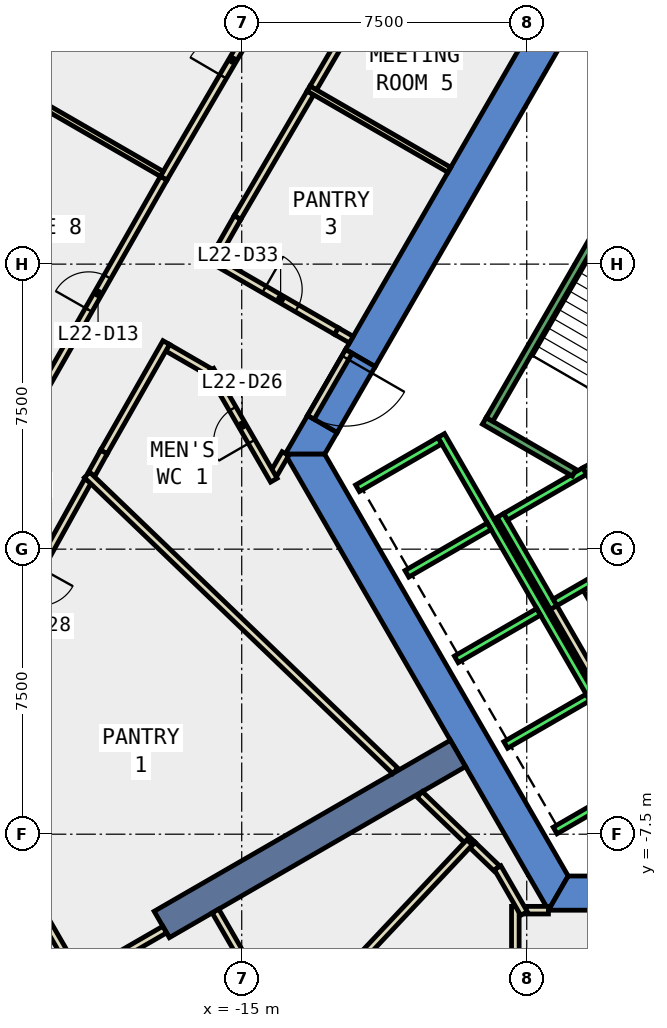
"""IFC4 building model, lengths in metres.
Left out: names, types, materials, properties, quantities, classifications, styles, units other than length and angle.
Written with IfcOpenShell. Run it as: python <this file> out.ifc"""

import sys

from ifc_helpers import new_model, si_unit, direction, frame, frame_2d, origin, place, context, subcontext, project, spatial, polyline, rectangle, outline, extrude, element, fill, save


model = new_model("IFC4")
c1 = context("Model", 3, precision=1e-05, world=origin(), true_north=direction((0.0, 1.0)))
c2 = subcontext(c1, "Body", "Model", "MODEL_VIEW")
j1 = project(units=[si_unit("LENGTHUNIT", "METRE"), si_unit("PLANEANGLEUNIT", "RADIAN")], contexts=[c1])
p1 = place(None, origin())
s1 = spatial("IfcSite", under=j1, at=p1, CompositionType="ELEMENT")
p2 = place(p1, origin())
s2 = spatial("IfcBuilding", under=s1, at=p2, CompositionType="ELEMENT")
p3 = place(p2, frame((0.0, 0.0, 103.4)))
s3 = spatial("IfcBuildingStorey", under=s2, at=p3, CompositionType="ELEMENT", Elevation=103.4)
p4 = place(p3, frame((0.0, 0.0, -0.4)))
e1 = element("IfcWall", 1, at=p4, inside=s3, PredefinedType="SHEAR", context=c2, shape_type="SweptSolid", body=[
    extrude(outline(polyline([(-12.267, 5.252), (-11.488, 4.802), (-6.409, 13.6), (-6.928, 14.5), (-12.267, 5.252)])), origin(), (0.0, 0.0, 1.0), 4.2),
])
p5 = place(p3, frame((0.0, 0.0, -0.4)))
e2 = element("IfcWall", 2, at=p5, inside=s3, PredefinedType="SHEAR", context=c2, shape_type="SweptSolid", body=[
    extrude(outline(polyline([(-12.488, 3.07), (-13.267, 3.52), (-13.856, 2.5), (-12.817, 2.5), (-12.488, 3.07)])), origin(), (0.0, 0.0, 1.0), 4.2),
])
p6 = place(p3, frame((0.0, 0.0, 3.6)))
e3 = element("IfcWall", 3, at=p6, inside=s3, PredefinedType="SHEAR", context=c2, shape_type="SweptSolid", body=[
    extrude(outline(polyline([(-13.267, 3.52), (-12.488, 3.07), (-11.488, 4.802), (-12.267, 5.252), (-13.267, 3.52)])), origin(), (0.0, 0.0, 1.0), 0.2),
])
p7 = place(p3, frame((0.0, 0.0, -0.4)))
e4 = element("IfcWall", 4, at=p7, inside=s3, PredefinedType="SHEAR", context=c2, shape_type="SweptSolid", body=[
    extrude(outline(polyline([(-13.856, 2.5), (-6.928, -9.5), (-6.409, -8.6), (-12.817, 2.5), (-13.856, 2.5)])), origin(), (0.0, 0.0, 1.0), 4.2),
])
p8 = place(p3, frame((0.0, 0.0, -0.4)))
e5 = element("IfcWall", 5, at=p8, inside=s3, PredefinedType="SHEAR", context=c2, shape_type="SweptSolid", body=[
    extrude(outline(polyline([(3.75, -9.5), (3.75, -8.6), (-6.409, -8.6), (-6.928, -9.5), (3.75, -9.5)])), origin(), (0.0, 0.0, 1.0), 4.2),
])
p9 = place(p3, frame((-9.31, -5.375, -0.4), z_axis=(0.0, 0.0, 1.0), x_axis=(-0.866017533419, -0.500013631625, 0.0)))
e6 = element("IfcWall", 6, at=p9, inside=s3, PredefinedType="SHEAR", context=c2, shape_type="SweptSolid", body=[
    extrude(rectangle(XDim=9.0, YDim=0.8, at=frame_2d((4.5, 0.0))), origin(), (0.0, 0.0, 1.0), 4.2),
])
p10 = place(p3, frame((-11.814, 14.364, 0.0), z_axis=(0.0, 0.0, 1.0), x_axis=(-0.504658640018, -0.863318977583, 0.0)))
e7 = element("IfcWall", 7, at=p10, inside=s3, PredefinedType="PARTITIONING", context=c2, shape_type="SweptSolid", body=[
    extrude(rectangle(XDim=2.582, YDim=0.2, at=frame_2d((1.291, 0.0))), origin(), (0.0, 0.0, 1.0), 3.8),
])
p11 = place(p3, frame((-13.193, 12.005, 0.0), z_axis=(0.0, 0.0, 1.0), x_axis=(-0.50499711829, -0.863121028894, 0.0)))
e8 = element("IfcWall", 8, at=p11, inside=s3, PredefinedType="PARTITIONING", context=c2, shape_type="SweptSolid", body=[
    extrude(rectangle(XDim=3.8, YDim=0.2, at=frame_2d((1.9, 0.0))), origin(), (0.0, 0.0, 1.0), 3.8),
])
p12 = place(p3, frame((-15.112, 8.725, 0.0), z_axis=(0.0, 0.0, 1.0), x_axis=(-0.495074026382, -0.868850797549, 0.0)))
e9 = element("IfcWall", 9, at=p12, inside=s3, PredefinedType="PARTITIONING", context=c2, shape_type="SweptSolid", body=[
    extrude(rectangle(XDim=1.186, YDim=0.2, at=frame_2d((0.593, 0.0))), origin(), (0.0, 0.0, 1.0), 3.8),
])
p13 = place(p3, frame((-15.835, 7.658, 0.0), z_axis=(0.0, 0.0, 1.0), x_axis=(0.866076614194, -0.499911290476, 0.0)))
e10 = element("IfcWall", 10, at=p13, inside=s3, PredefinedType="PARTITIONING", context=c2, shape_type="SweptSolid", body=[
    extrude(rectangle(XDim=3.843, YDim=0.2, at=frame_2d((1.921, 0.0))), origin(), (0.0, 0.0, 1.0), 3.8),
])
p14 = place(p13, frame((1.646, 0.0, 0.0)))
e11 = element("IfcOpeningElement", 11, at=p14, cuts=e10, PredefinedType="OPENING", context=c2, shape_type="SweptSolid", body=[
    extrude(rectangle(XDim=1.0, YDim=2.1, at=frame_2d((0.5, 1.05))), frame((0.0, 0.11, 0.0), z_axis=(0.0, -1.0, 0.0), x_axis=(1.0, 0.0, 0.0)), (0.0, 0.0, 1.0), 0.22),
])
p15 = place(p3, frame((-13.85, 2.514, 0.0), z_axis=(0.0, 0.0, 1.0), x_axis=(-0.500418219013, -0.865783810244, 0.0)))
e12 = element("IfcWall", 12, at=p15, inside=s3, PredefinedType="PARTITIONING", context=c2, shape_type="SweptSolid", body=[
    extrude(rectangle(XDim=0.607, YDim=0.2, at=frame_2d((0.304, 0.0))), origin(), (0.0, 0.0, 1.0), 3.8),
])
p16 = place(p3, frame((-14.154, 1.815, 0.0), z_axis=(0.0, 0.0, 1.0), x_axis=(-0.500038857296, 0.866002968352, 0.0)))
e13 = element("IfcWall", 13, at=p16, inside=s3, PredefinedType="PARTITIONING", context=c2, shape_type="SweptSolid", body=[
    extrude(rectangle(XDim=3.34, YDim=0.2, at=frame_2d((1.67, 0.0))), origin(), (0.0, 0.0, 1.0), 3.8),
])
p17 = place(p16, frame((1.17, 0.0, 0.0)))
e14 = element("IfcOpeningElement", 14, at=p17, cuts=e13, PredefinedType="OPENING", context=c2, shape_type="SweptSolid", body=[
    extrude(rectangle(XDim=1.0, YDim=2.1, at=frame_2d((0.5, 1.05))), frame((0.0, 0.11, 0.0), z_axis=(0.0, -1.0, 0.0), x_axis=(1.0, 0.0, 0.0)), (0.0, 0.0, 1.0), 0.22),
])
p18 = place(p3, frame((-15.86, 4.671, 0.0), z_axis=(0.0, 0.0, 1.0), x_axis=(-0.866192052573, 0.49971124468, 0.0)))
e15 = element("IfcWall", 15, at=p18, inside=s3, PredefinedType="PARTITIONING", context=c2, shape_type="SweptSolid", body=[
    extrude(rectangle(XDim=1.257, YDim=0.2, at=frame_2d((0.628, 0.0))), origin(), (0.0, 0.0, 1.0), 3.8),
])
p19 = place(p3, frame((-16.986, 5.436, 0.0), z_axis=(0.0, 0.0, 1.0), x_axis=(-0.49514688151, -0.868809280412, 0.0)))
e16 = element("IfcWall", 16, at=p19, inside=s3, PredefinedType="PARTITIONING", context=c2, shape_type="SweptSolid", body=[
    extrude(rectangle(XDim=3.314, YDim=0.2, at=frame_2d((1.657, 0.0))), origin(), (0.0, 0.0, 1.0), 3.8),
])
p20 = place(p3, frame((-18.627, 2.557, 0.0), z_axis=(0.0, 0.0, 1.0), x_axis=(-0.484771582084, -0.874640790956, 0.0)))
e17 = element("IfcWall", 17, at=p20, inside=s3, PredefinedType="PARTITIONING", context=c2, shape_type="SweptSolid", body=[
    extrude(rectangle(XDim=0.666, YDim=0.2, at=frame_2d((0.333, 0.0))), origin(), (0.0, 0.0, 1.0), 3.8),
])
p21 = place(p3, frame((-19.047, 1.799, 0.0), z_axis=(0.0, 0.0, 1.0), x_axis=(-0.485240396382, -0.87438078531, 0.0)))
e18 = element("IfcWall", 18, at=p21, inside=s3, PredefinedType="PARTITIONING", context=c2, shape_type="SweptSolid", body=[
    extrude(rectangle(XDim=6.232, YDim=0.2, at=frame_2d((3.116, 0.0))), origin(), (0.0, 0.0, 1.0), 3.8),
])
p22 = place(p21, frame((2.616, 0.0, 0.0)))
e19 = element("IfcOpeningElement", 19, at=p22, cuts=e18, PredefinedType="OPENING", context=c2, shape_type="SweptSolid", body=[
    extrude(rectangle(XDim=1.0, YDim=2.1, at=frame_2d((0.5, 1.05))), frame((0.0, 0.11, 0.0), z_axis=(0.0, -1.0, 0.0), x_axis=(1.0, 0.0, 0.0)), (0.0, 0.0, 1.0), 0.22),
])
p23 = place(p3, frame((-17.055, 9.76, 0.0), z_axis=(0.0, 0.0, 1.0), x_axis=(0.504817517618, 0.863226085047, 0.0)))
e20 = element("IfcWall", 20, at=p23, inside=s3, PredefinedType="PARTITIONING", context=c2, shape_type="SweptSolid", body=[
    extrude(rectangle(XDim=7.199, YDim=0.2, at=frame_2d((3.599, 0.0))), origin(), (0.0, 0.0, 1.0), 3.8),
])
p24 = place(p23, frame((3.099, 0.0, 0.0)))
e21 = element("IfcOpeningElement", 21, at=p24, cuts=e20, PredefinedType="OPENING", context=c2, shape_type="SweptSolid", body=[
    extrude(rectangle(XDim=1.0, YDim=2.1, at=frame_2d((0.5, 1.05))), frame((0.0, 0.11, 0.0), z_axis=(0.0, -1.0, 0.0), x_axis=(1.0, 0.0, 0.0)), (0.0, 0.0, 1.0), 0.22),
])
p25 = place(p3, frame((-20.581, 3.571, 0.0), z_axis=(0.0, 0.0, 1.0), x_axis=(0.495138372197, 0.868814129937, 0.0)))
e22 = element("IfcWall", 22, at=p25, inside=s3, PredefinedType="PARTITIONING", context=c2, shape_type="SweptSolid", body=[
    extrude(rectangle(XDim=7.124, YDim=0.2, at=frame_2d((3.562, 0.0))), origin(), (0.0, 0.0, 1.0), 3.8),
])
p26 = place(p25, frame((3.137, 0.0, 0.0)))
e23 = element("IfcOpeningElement", 23, at=p26, cuts=e22, PredefinedType="OPENING", context=c2, shape_type="SweptSolid", body=[
    extrude(rectangle(XDim=1.0, YDim=2.1, at=frame_2d((0.5, 1.05))), frame((0.0, 0.11, 0.0), z_axis=(0.0, -1.0, 0.0), x_axis=(1.0, 0.0, 0.0)), (0.0, 0.0, 1.0), 0.22),
])
p27 = place(p3, frame((-5.126, -2.422, 0.0), z_axis=(0.0, 0.0, 1.0), x_axis=(-0.500062241894, 0.865989465428, 0.0)))
e24 = element("IfcWall", 24, at=p27, inside=s3, PredefinedType="PARTITIONING", context=c2, shape_type="SweptSolid", body=[
    extrude(rectangle(XDim=1.7, YDim=0.2, at=frame_2d((0.85, 0.0))), origin(), (0.0, 0.0, 1.0), 3.8),
])
p28 = place(p3, frame((-5.492, -3.788, 0.0), z_axis=(0.0, 0.0, 1.0), x_axis=(-0.500008949224, 0.866020236886, 0.0)))
e25 = element("IfcWall", 25, at=p28, inside=s3, PredefinedType="PARTITIONING", context=c2, shape_type="SweptSolid", body=[
    extrude(rectangle(XDim=2.68, YDim=0.2, at=frame_2d((1.34, 0.0))), origin(), (0.0, 0.0, 1.0), 3.8),
])
p29 = place(p3, frame((-9.537, 9.981, 0.0), z_axis=(0.0, 0.0, 1.0), x_axis=(-0.866007866579, 0.5000303741, 0.0)))
e26 = element("IfcWall", 26, at=p29, inside=s3, PredefinedType="PARTITIONING", context=c2, shape_type="SweptSolid", body=[
    extrude(rectangle(XDim=4.278, YDim=0.15, at=frame_2d((2.139, 0.0))), origin(), (0.0, 0.0, 1.0), 3.8),
])
p30 = place(p3, frame((-7.522, -9.499, 0.0), z_axis=(0.0, 0.0, 1.0), x_axis=(1.0, 0.0, 0.0)))
e27 = element("IfcWall", 27, at=p30, inside=s3, PredefinedType="PARTITIONING", context=c2, shape_type="SweptSolid", body=[
    extrude(rectangle(XDim=0.593, YDim=0.2, at=frame_2d((0.296, 0.0))), origin(), (0.0, 0.0, 1.0), 3.8),
])
p31 = place(p3, frame((-7.8, -17.765, 0.0), z_axis=(0.0, 0.0, 1.0), x_axis=(0.0, 1.0, 0.0)))
e28 = element("IfcWall", 28, at=p31, inside=s3, PredefinedType="PARTITIONING", context=c2, shape_type="SweptSolid", body=[
    extrude(rectangle(XDim=8.366, YDim=0.2, at=frame_2d((4.183, 0.0))), origin(), (0.0, 0.0, 1.0), 3.8),
])
p32 = place(p31, frame((3.683, 0.0, 0.0)))
e29 = element("IfcOpeningElement", 29, at=p32, cuts=e28, PredefinedType="OPENING", context=c2, shape_type="SweptSolid", body=[
    extrude(rectangle(XDim=1.0, YDim=2.1, at=frame_2d((0.5, 1.05))), frame((0.0, 0.11, 0.0), z_axis=(0.0, -1.0, 0.0), x_axis=(1.0, 0.0, 0.0)), (0.0, 0.0, 1.0), 0.22),
])
p33 = place(p3, frame((-8.93, -7.783, 0.0), z_axis=(0.0, 0.0, 1.0), x_axis=(0.720954255291, -0.692982656189, 0.0)))
e30 = element("IfcWall", 30, at=p33, inside=s3, PredefinedType="PARTITIONING", context=c2, shape_type="SweptSolid", body=[
    extrude(rectangle(XDim=0.89, YDim=0.2, at=frame_2d((0.445, 0.0))), origin(), (0.0, 0.0, 1.0), 3.8),
])
p34 = place(p3, frame((-7.572, -9.586, 0.0), z_axis=(0.0, 0.0, 1.0), x_axis=(-0.499484152563, 0.866323023669, 0.0)))
e31 = element("IfcWall", 31, at=p34, inside=s3, PredefinedType="PARTITIONING", context=c2, shape_type="SweptSolid", body=[
    extrude(rectangle(XDim=1.39, YDim=0.2, at=frame_2d((0.695, 0.0))), origin(), (0.0, 0.0, 1.0), 3.8),
])
p35 = place(p3, frame((-8.93, -7.783, 0.0), z_axis=(0.0, 0.0, 1.0), x_axis=(-0.72124523191, 0.692679807305, 0.0)))
e32 = element("IfcWall", 32, at=p35, inside=s3, PredefinedType="PARTITIONING", context=c2, shape_type="SweptSolid", body=[
    extrude(rectangle(XDim=1.923, YDim=0.2, at=frame_2d((0.961, 0.0))), origin(), (0.0, 0.0, 1.0), 3.8),
])
p36 = place(p3, frame((-13.865, -12.876, 0.0), z_axis=(0.0, 0.0, 1.0), x_axis=(0.685651384846, 0.727930064263, 0.0)))
e33 = element("IfcWall", 33, at=p36, inside=s3, PredefinedType="PARTITIONING", context=c2, shape_type="SweptSolid", body=[
    extrude(rectangle(XDim=7.091, YDim=0.2, at=frame_2d((3.545, 0.0))), origin(), (0.0, 0.0, 1.0), 3.8),
])
p37 = place(p3, frame((-13.847, -12.716, 0.0), z_axis=(0.0, 0.0, 1.0), x_axis=(-0.499861859587, 0.866105144501, 0.0)))
e34 = element("IfcWall", 34, at=p37, inside=s3, PredefinedType="PARTITIONING", context=c2, shape_type="SweptSolid", body=[
    extrude(rectangle(XDim=3.689, YDim=0.2, at=frame_2d((1.844, 0.0))), origin(), (0.0, 0.0, 1.0), 3.8),
])
p38 = place(p3, frame((-17.027, -10.009, 0.0), z_axis=(0.0, 0.0, 1.0), x_axis=(-0.865950948929, -0.500128937424, 0.0)))
e35 = element("IfcWall", 35, at=p38, inside=s3, PredefinedType="PARTITIONING", context=c2, shape_type="SweptSolid", body=[
    extrude(rectangle(XDim=2.599, YDim=0.2, at=frame_2d((1.3, 0.0))), origin(), (0.0, 0.0, 1.0), 3.8),
])
p39 = place(p3, frame((-19.278, -11.309, 0.0), z_axis=(0.0, 0.0, 1.0), x_axis=(-0.500044545065, 0.865999684151, 0.0)))
e36 = element("IfcWall", 36, at=p39, inside=s3, PredefinedType="PARTITIONING", context=c2, shape_type="SweptSolid", body=[
    extrude(rectangle(XDim=7.261, YDim=0.2, at=frame_2d((3.63, 0.0))), origin(), (0.0, 0.0, 1.0), 3.8),
])
p40 = place(p3, frame((-17.104, 9.875, 0.0), z_axis=(0.0, 0.0, 1.0), x_axis=(-0.866024640963, 0.500001321243, 0.0)))
e37 = element("IfcWall", 37, at=p40, inside=s3, PredefinedType="PARTITIONING", context=c2, shape_type="SweptSolid", body=[
    extrude(rectangle(XDim=5.33, YDim=0.15, at=frame_2d((2.665, 0.0))), origin(), (0.0, 0.0, 1.0), 3.8),
])
p41 = place(p3, frame((-12.18, 5.202, 0.0), z_axis=(0.0, 0.0, 1.0), x_axis=(-0.50002537861, -0.866010750942, 0.0)))
e38 = element("IfcWall", 38, at=p41, inside=s3, PredefinedType="PARTITIONING", context=c2, shape_type="SweptSolid", body=[
    extrude(rectangle(XDim=2.0, YDim=0.2, at=frame_2d((1.0, 0.0))), origin(), (0.0, 0.0, 1.0), 2.4),
])
p42 = place(p41, frame((0.19, 0.0, 0.0)))
e39 = element("IfcOpeningElement", 39, at=p42, cuts=e38, PredefinedType="OPENING", context=c2, shape_type="SweptSolid", body=[
    extrude(rectangle(XDim=1.8, YDim=2.1, at=frame_2d((0.9, 1.05))), frame((0.0, 0.11, 0.0), z_axis=(0.0, -1.0, 0.0), x_axis=(1.0, 0.0, 0.0)), (0.0, 0.0, 1.0), 0.22),
])
p43 = place(p3, frame((-10.96, -5.834, 0.0), z_axis=(0.0, 0.0, 1.0), x_axis=(-0.721236335428, 0.692689070549, 0.0)))
e40 = element("IfcWall", 40, at=p43, inside=s3, PredefinedType="PARTITIONING", context=c2, shape_type="SweptSolid", body=[
    extrude(rectangle(XDim=11.246, YDim=0.2, at=frame_2d((5.623, 0.0))), origin(), (0.0, 0.0, 1.0), 3.8),
])
p44 = place(p3, frame((-12.507, 5.737, 0.0), z_axis=(0.0, 0.0, 1.0), x_axis=(0.866167537795, -0.499753735824, 0.0)))
e41 = element("IfcWall", 41, at=p44, inside=s3, PredefinedType="PARTITIONING", context=c2, shape_type="SweptSolid", body=[
    extrude(rectangle(XDim=0.45, YDim=0.2, at=frame_2d((0.225, 0.0))), origin(), (0.0, 0.0, 1.0), 2.4),
])
p45 = place(p3, frame((-5.94, 2.188, 0.0), z_axis=(0.0, 0.0, 1.0), x_axis=(0.49994636267, -0.866056369097, 0.0)))
e42 = element("IfcWall", 42, at=p45, inside=s3, PredefinedType="STANDARD", context=c2, shape_type="SweptSolid", body=[
    extrude(rectangle(XDim=2.8, YDim=0.2, at=frame_2d((1.4, 0.0))), origin(), (0.0, 0.0, 1.0), 3.8),
])
p46 = place(p45, frame((1.225, 0.0, 0.0)))
e43 = element("IfcOpeningElement", 43, at=p46, cuts=e42, PredefinedType="OPENING", context=c2, shape_type="SweptSolid", body=[
    extrude(rectangle(XDim=1.1, YDim=2.1, at=frame_2d((0.55, 1.05))), frame((0.0, 0.11, 0.0), z_axis=(0.0, -1.0, 0.0), x_axis=(1.0, 0.0, 0.0)), (0.0, 0.0, 1.0), 0.22),
])
p47 = place(p3, frame((-8.192, 0.888, 0.0), z_axis=(0.0, 0.0, 1.0), x_axis=(0.49994636267, -0.866056369097, 0.0)))
e44 = element("IfcWall", 44, at=p47, inside=s3, PredefinedType="STANDARD", context=c2, shape_type="SweptSolid", body=[
    extrude(rectangle(XDim=2.8, YDim=0.2, at=frame_2d((1.4, 0.0))), origin(), (0.0, 0.0, 1.0), 3.8),
])
for number, where, z_axis, x_axis in (
    (45, (-5.977, 2.052, 0.0), (0.0, 0.0, 1.0), (-0.866, -0.5, 0.0)),
    (46, (-4.677, -0.2, 0.0), (0.0, 0.0, 1.0), (-0.866, -0.5, 0.0)),
):
    element("IfcWall", number, at=place(p3, frame(where, z_axis=z_axis, x_axis=x_axis)), inside=s3, PredefinedType="STANDARD", context=c2, shape_type="SweptSolid", body=[
        extrude(rectangle(XDim=2.399, YDim=0.2, at=frame_2d((1.2, 0.0))), origin(), (0.0, 0.0, 1.0), 3.8),
    ])
p48 = place(p3, frame((-9.751, 2.99, 0.0), z_axis=(0.0, 0.0, 1.0), x_axis=(0.50000090737, -0.866024879913, 0.0)))
e47 = element("IfcWall", 47, at=p48, inside=s3, PredefinedType="STANDARD", context=c2, shape_type="SweptSolid", body=[
    extrude(rectangle(XDim=10.6, YDim=0.2, at=frame_2d((5.3, 0.0))), origin(), (0.0, 0.0, 1.0), 3.8),
])
p49 = place(p3, frame((-9.788, 2.853, 0.0), z_axis=(0.0, 0.0, 1.0), x_axis=(-0.865998541277, -0.500046524342, 0.0)))
e48 = element("IfcWall", 48, at=p49, inside=s3, PredefinedType="STANDARD", context=c2, shape_type="SweptSolid", body=[
    extrude(rectangle(XDim=2.5, YDim=0.2, at=frame_2d((1.25, 0.0))), origin(), (0.0, 0.0, 1.0), 3.8),
])
for number, where, z_axis, x_axis in (
    (49, (-8.488, 0.602, 0.0), (0.0, 0.0, 1.0), (-0.866, -0.5, 0.0)),
    (50, (-7.188, -1.65, 0.0), (0.0, 0.0, 1.0), (-0.866, -0.5, 0.0)),
    (51, (-5.888, -3.902, 0.0), (0.0, 0.0, 1.0), (-0.866, -0.5, 0.0)),
    (52, (-4.588, -6.153, 0.0), (0.0, 0.0, 1.0), (-0.866, -0.5, 0.0)),
):
    element("IfcWall", number, at=place(p3, frame(where, z_axis=z_axis, x_axis=x_axis)), inside=s3, PredefinedType="STANDARD", context=c2, shape_type="SweptSolid", body=[
        extrude(rectangle(XDim=2.5, YDim=0.2, at=frame_2d((1.25, 0.0))), origin(), (0.0, 0.0, 1.0), 3.8),
    ])
p50 = place(p3, frame((-6.25, 2.01, 0.0), z_axis=(0.0, 0.0, 1.0), x_axis=(-0.86611865017, 0.499838457731, 0.0)))
e53 = element("IfcWall", 53, at=p50, inside=s3, PredefinedType="STANDARD", context=c2, shape_type="SweptSolid", body=[
    extrude(rectangle(XDim=2.733, YDim=0.2, at=frame_2d((1.366, 0.0))), origin(), (0.0, 0.0, 1.0), 3.8),
])
p51 = place(p3, frame((-5.03, 9.388, 0.0), z_axis=(0.0, 0.0, 1.0), x_axis=(-0.499978703459, -0.866037698999, 0.0)))
e54 = element("IfcWall", 54, at=p51, inside=s3, PredefinedType="STANDARD", context=c2, shape_type="SweptSolid", body=[
    extrude(rectangle(XDim=6.9, YDim=0.2, at=frame_2d((3.45, 0.0))), origin(), (0.0, 0.0, 1.0), 3.8),
])
p52 = place(p24, origin())
e55 = element("IfcDoor", 55, at=p52, inside=s3, OperationType="SINGLE_SWING_LEFT", PredefinedType="DOOR", context=c2, shape_type="SweptSolid", body=[
    extrude(rectangle(XDim=1.0, YDim=2.1, at=frame_2d((0.5, 1.05))), frame((0.0, 0.025, 0.0), z_axis=(0.0, -1.0, 0.0), x_axis=(1.0, 0.0, 0.0)), (0.0, 0.0, 1.0), 0.05),
])
fill(e21, e55)
p53 = place(p26, origin())
e56 = element("IfcDoor", 56, at=p53, inside=s3, OperationType="SINGLE_SWING_LEFT", PredefinedType="DOOR", context=c2, shape_type="SweptSolid", body=[
    extrude(rectangle(XDim=1.0, YDim=2.1, at=frame_2d((0.5, 1.05))), frame((0.0, 0.025, 0.0), z_axis=(0.0, -1.0, 0.0), x_axis=(1.0, 0.0, 0.0)), (0.0, 0.0, 1.0), 0.05),
])
fill(e23, e56)
p54 = place(p17, origin())
e57 = element("IfcDoor", 57, at=p54, inside=s3, OperationType="SINGLE_SWING_LEFT", PredefinedType="DOOR", context=c2, shape_type="SweptSolid", body=[
    extrude(rectangle(XDim=1.0, YDim=2.1, at=frame_2d((0.5, 1.05))), frame((0.0, 0.025, 0.0), z_axis=(0.0, -1.0, 0.0), x_axis=(1.0, 0.0, 0.0)), (0.0, 0.0, 1.0), 0.05),
])
fill(e14, e57)
p55 = place(p14, origin())
e58 = element("IfcDoor", 58, at=p55, inside=s3, OperationType="SINGLE_SWING_LEFT", PredefinedType="DOOR", context=c2, shape_type="SweptSolid", body=[
    extrude(rectangle(XDim=1.0, YDim=2.1, at=frame_2d((0.5, 1.05))), frame((0.0, 0.025, 0.0), z_axis=(0.0, -1.0, 0.0), x_axis=(1.0, 0.0, 0.0)), (0.0, 0.0, 1.0), 0.05),
])
fill(e11, e58)
p56 = place(p42, origin())
e59 = element("IfcDoor", 59, at=p56, inside=s3, OperationType="DOUBLE_DOOR_SINGLE_SWING", PredefinedType="DOOR", context=c2, shape_type="SweptSolid", body=[
    extrude(rectangle(XDim=1.8, YDim=2.1, at=frame_2d((0.9, 1.05))), frame((0.0, 0.025, 0.0), z_axis=(0.0, -1.0, 0.0), x_axis=(1.0, 0.0, 0.0)), (0.0, 0.0, 1.0), 0.05),
])
fill(e39, e59)
save(model, sys.argv[1])
